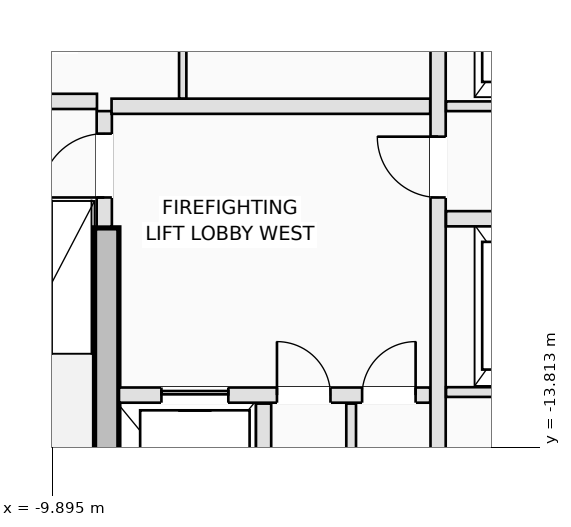
"""IFC4 building model, lengths in metres.
Left out: names, types, materials, properties, quantities, classifications, styles, units other than length and angle.
Written with IfcOpenShell. Run it as: python <this file> out.ifc"""

import sys

from ifc_helpers import new_model, si_unit, direction, frame, frame_2d, origin, place, context, subcontext, project, spatial, rectangle, extrude, element, fill, save


model = new_model("IFC4")
c1 = context("Model", 3, precision=1e-05, world=origin(), true_north=direction((0.0, 1.0)))
c2 = subcontext(c1, "Body", "Model", "MODEL_VIEW")
j1 = project(units=[si_unit("LENGTHUNIT", "METRE"), si_unit("PLANEANGLEUNIT", "RADIAN")], contexts=[c1])
p1 = place(None, origin())
s1 = spatial("IfcSite", under=j1, at=p1, CompositionType="ELEMENT")
p2 = place(p1, origin())
s2 = spatial("IfcBuilding", under=s1, at=p2, CompositionType="ELEMENT")
p3 = place(p2, frame((0.0, 0.0, 130.0)))
s3 = spatial("IfcBuildingStorey", under=s2, at=p3, CompositionType="ELEMENT", Elevation=130.0)
p4 = place(p3, frame((-9.0, -16.15, 0.0), z_axis=(0.0, 0.0, 1.0), x_axis=(0.0, 1.0, 0.0)))
e1 = element("IfcWall", 1, at=p4, inside=s3, PredefinedType="SHEAR", context=c2, shape_type="SweptSolid", body=[
    extrude(rectangle(XDim=5.95, YDim=0.4, at=frame_2d((2.975, 0.0))), origin(), (0.0, 0.0, 1.0), 3.5),
])
p5 = place(p3, frame((-9.04, -10.18, 0.0), z_axis=(0.0, 0.0, 1.0), x_axis=(0.0, 1.0, 0.0)))
e2 = element("IfcWall", 2, at=p5, inside=s3, PredefinedType="PARTITIONING", context=c2, shape_type="SweptSolid", body=[
    extrude(rectangle(XDim=1.9, YDim=0.25, at=frame_2d((0.95, 0.0))), origin(), (0.0, 0.0, 1.0), 3.25),
])
p6 = place(p5, frame((0.48, 0.0, 0.0)))
e3 = element("IfcOpeningElement", 3, at=p6, cuts=e2, PredefinedType="OPENING", context=c2, shape_type="SweptSolid", body=[
    extrude(rectangle(XDim=1.05, YDim=2.15, at=frame_2d((0.525, 1.075))), frame((0.0, 0.135, 0.0), z_axis=(0.0, -1.0, 0.0), x_axis=(1.0, 0.0, 0.0)), (0.0, 0.0, 1.0), 0.27),
])
p7 = place(p3, frame((-12.38, -8.12, 0.0), z_axis=(0.0, 0.0, 1.0), x_axis=(1.0, 0.0, 0.0)))
e4 = element("IfcWall", 4, at=p7, inside=s3, PredefinedType="PARTITIONING", context=c2, shape_type="SweptSolid", body=[
    extrude(rectangle(XDim=3.22, YDim=0.25, at=frame_2d((1.61, 0.0))), origin(), (0.0, 0.0, 1.0), 3.25),
])
p8 = place(p3, frame((-8.798, -12.95, 0.0), z_axis=(0.0, 0.0, 1.0), x_axis=(1.0, 0.0, 0.0)))
e5 = element("IfcWall", 5, at=p8, inside=s3, PredefinedType="PARTITIONING", context=c2, shape_type="SweptSolid", body=[
    extrude(rectangle(XDim=5.118, YDim=0.25, at=frame_2d((2.559, 0.0))), origin(), (0.0, 0.0, 1.0), 3.25),
])
p9 = place(p8, frame((0.698, 0.0, 0.0)))
e6 = element("IfcOpeningElement", 6, at=p9, cuts=e5, PredefinedType="OPENING", context=c2, shape_type="SweptSolid", body=[
    extrude(rectangle(XDim=1.1, YDim=2.15, at=frame_2d((0.55, 1.075))), frame((0.0, 0.135, 0.0), z_axis=(0.0, -1.0, 0.0), x_axis=(1.0, 0.0, 0.0)), (0.0, 0.0, 1.0), 0.27),
])
p10 = place(p8, frame((2.598, 0.0, 0.0)))
e7 = element("IfcOpeningElement", 7, at=p10, cuts=e5, PredefinedType="OPENING", context=c2, shape_type="SweptSolid", body=[
    extrude(rectangle(XDim=0.88, YDim=2.1, at=frame_2d((0.44, 1.05))), frame((0.0, 0.135, 0.0), z_axis=(0.0, -1.0, 0.0), x_axis=(1.0, 0.0, 0.0)), (0.0, 0.0, 1.0), 0.27),
])
p11 = place(p8, frame((3.998, 0.0, 0.0)))
e8 = element("IfcOpeningElement", 8, at=p11, cuts=e5, PredefinedType="OPENING", context=c2, shape_type="SweptSolid", body=[
    extrude(rectangle(XDim=0.88, YDim=2.1, at=frame_2d((0.44, 1.05))), frame((0.0, 0.135, 0.0), z_axis=(0.0, -1.0, 0.0), x_axis=(1.0, 0.0, 0.0)), (0.0, 0.0, 1.0), 0.27),
])
p12 = place(p3, frame((-6.42, -15.92, 0.0), z_axis=(0.0, 0.0, 1.0), x_axis=(0.0, 1.0, 0.0)))
e9 = element("IfcWall", 9, at=p12, inside=s3, PredefinedType="PARTITIONING", context=c2, shape_type="SweptSolid", body=[
    extrude(rectangle(XDim=2.83, YDim=0.25, at=frame_2d((1.415, 0.0))), origin(), (0.0, 0.0, 1.0), 3.25),
])
p13 = place(p3, frame((-4.98, -15.92, 0.0), z_axis=(0.0, 0.0, 1.0), x_axis=(0.0, 1.0, 0.0)))
e10 = element("IfcWall", 10, at=p13, inside=s3, PredefinedType="PARTITIONING", context=c2, shape_type="SweptSolid", body=[
    extrude(rectangle(XDim=2.83, YDim=0.16, at=frame_2d((1.415, 0.0))), origin(), (0.0, 0.0, 1.0), 3.25),
])
p14 = place(p3, frame((-8.92, -8.2, 0.0), z_axis=(0.0, 0.0, 1.0), x_axis=(1.0, 0.0, 0.0)))
e11 = element("IfcWall", 11, at=p14, inside=s3, PredefinedType="PARTITIONING", context=c2, shape_type="SweptSolid", body=[
    extrude(rectangle(XDim=5.24, YDim=0.25, at=frame_2d((2.62, 0.0))), origin(), (0.0, 0.0, 1.0), 3.25),
])
p15 = place(p3, frame((-3.55, -15.798, 0.0), z_axis=(0.0, 0.0, 1.0), x_axis=(0.0, 1.0, 0.0)))
e12 = element("IfcWall", 12, at=p15, inside=s3, PredefinedType="PARTITIONING", context=c2, shape_type="SweptSolid", body=[
    extrude(rectangle(XDim=10.446, YDim=0.25, at=frame_2d((5.223, 0.0))), origin(), (0.0, 0.0, 1.0), 3.25),
])
p16 = place(p15, frame((6.098, 0.0, 0.0)))
e13 = element("IfcOpeningElement", 13, at=p16, cuts=e12, PredefinedType="OPENING", context=c2, shape_type="SweptSolid", body=[
    extrude(rectangle(XDim=1.0, YDim=2.15, at=frame_2d((0.5, 1.075))), frame((0.0, 0.135, 0.0), z_axis=(0.0, -1.0, 0.0), x_axis=(1.0, 0.0, 0.0)), (0.0, 0.0, 1.0), 0.27),
])
p17 = place(p3, frame((-7.75, -8.073, 0.0), z_axis=(0.0, 0.0, 1.0), x_axis=(0.0, 1.0, 0.0)))
e14 = element("IfcWall", 14, at=p17, inside=s3, PredefinedType="PARTITIONING", context=c2, shape_type="SweptSolid", body=[
    extrude(rectangle(XDim=2.733, YDim=0.12, at=frame_2d((1.366, 0.0))), origin(), (0.0, 0.0, 1.0), 3.25),
])
p18 = place(p3, frame((-3.42, -8.2, 0.0), z_axis=(0.0, 0.0, 1.0), x_axis=(1.0, 0.0, 0.0)))
e15 = element("IfcWall", 15, at=p18, inside=s3, PredefinedType="PARTITIONING", context=c2, shape_type="SweptSolid", body=[
    extrude(rectangle(XDim=2.47, YDim=0.16, at=frame_2d((1.235, 0.0))), origin(), (0.0, 0.0, 1.0), 3.25),
])
p19 = place(p3, frame((-3.42, -10.05, 0.0), z_axis=(0.0, 0.0, 1.0), x_axis=(1.0, 0.0, 0.0)))
e16 = element("IfcWall", 16, at=p19, inside=s3, PredefinedType="PARTITIONING", context=c2, shape_type="SweptSolid", body=[
    extrude(rectangle(XDim=2.47, YDim=0.25, at=frame_2d((1.235, 0.0))), origin(), (0.0, 0.0, 1.0), 3.25),
])
p20 = place(p19, frame((0.92, 0.0, 0.0)))
e17 = element("IfcOpeningElement", 17, at=p20, cuts=e16, PredefinedType="OPENING", context=c2, shape_type="SweptSolid", body=[
    extrude(rectangle(XDim=1.0, YDim=2.15, at=frame_2d((0.5, 1.075))), frame((0.0, 0.135, 0.0), z_axis=(0.0, -1.0, 0.0), x_axis=(1.0, 0.0, 0.0)), (0.0, 0.0, 1.0), 0.27),
])
p21 = place(p3, frame((-3.42, -12.9, 0.0), z_axis=(0.0, 0.0, 1.0), x_axis=(1.0, 0.0, 0.0)))
e18 = element("IfcWall", 18, at=p21, inside=s3, PredefinedType="PARTITIONING", context=c2, shape_type="SweptSolid", body=[
    extrude(rectangle(XDim=6.84, YDim=0.16, at=frame_2d((3.42, 0.0))), origin(), (0.0, 0.0, 1.0), 3.25),
])
p22 = place(p21, frame((2.98, 0.0, 0.0)))
e19 = element("IfcOpeningElement", 19, at=p22, cuts=e18, PredefinedType="OPENING", context=c2, shape_type="SweptSolid", body=[
    extrude(rectangle(XDim=0.88, YDim=2.12, at=frame_2d((0.44, 1.06))), frame((0.0, 0.09, 0.0), z_axis=(0.0, -1.0, 0.0), x_axis=(1.0, 0.0, 0.0)), (0.0, 0.0, 1.0), 0.18),
])
p23 = place(p9, origin())
e20 = element("IfcDoor", 20, at=p23, inside=s3, OperationType="SLIDING_TO_LEFT", PredefinedType="DOOR", context=c2, shape_type="SweptSolid", body=[
    extrude(rectangle(XDim=1.1, YDim=2.15, at=frame_2d((0.55, 1.075))), frame((0.0, 0.025, 0.0), z_axis=(0.0, -1.0, 0.0), x_axis=(1.0, 0.0, 0.0)), (0.0, 0.0, 1.0), 0.05),
])
fill(e6, e20)
p24 = place(p6, origin())
e21 = element("IfcDoor", 21, at=p24, inside=s3, OperationType="SINGLE_SWING_LEFT", PredefinedType="DOOR", context=c2, shape_type="SweptSolid", body=[
    extrude(rectangle(XDim=1.05, YDim=2.15, at=frame_2d((0.525, 1.075))), frame((0.0, 0.025, 0.0), z_axis=(0.0, -1.0, 0.0), x_axis=(1.0, 0.0, 0.0)), (0.0, 0.0, 1.0), 0.05),
])
fill(e3, e21)
p25 = place(p10, origin())
e22 = element("IfcDoor", 22, at=p25, inside=s3, OperationType="SINGLE_SWING_LEFT", PredefinedType="TRAPDOOR", context=c2, shape_type="SweptSolid", body=[
    extrude(rectangle(XDim=0.88, YDim=2.1, at=frame_2d((0.44, 1.05))), frame((0.0, 0.025, 0.0), z_axis=(0.0, -1.0, 0.0), x_axis=(1.0, 0.0, 0.0)), (0.0, 0.0, 1.0), 0.05),
])
fill(e7, e22)
p26 = place(p11, origin())
e23 = element("IfcDoor", 23, at=p26, inside=s3, OperationType="SINGLE_SWING_RIGHT", PredefinedType="TRAPDOOR", context=c2, shape_type="SweptSolid", body=[
    extrude(rectangle(XDim=0.88, YDim=2.1, at=frame_2d((0.44, 1.05))), frame((0.0, 0.025, 0.0), z_axis=(0.0, -1.0, 0.0), x_axis=(1.0, 0.0, 0.0)), (0.0, 0.0, 1.0), 0.05),
])
fill(e8, e23)
p27 = place(p16, origin())
e24 = element("IfcDoor", 24, at=p27, inside=s3, OperationType="SINGLE_SWING_RIGHT", PredefinedType="DOOR", context=c2, shape_type="SweptSolid", body=[
    extrude(rectangle(XDim=1.0, YDim=2.15, at=frame_2d((0.5, 1.075))), frame((0.0, 0.025, 0.0), z_axis=(0.0, -1.0, 0.0), x_axis=(1.0, 0.0, 0.0)), (0.0, 0.0, 1.0), 0.05),
])
fill(e13, e24)
save(model, sys.argv[1])
